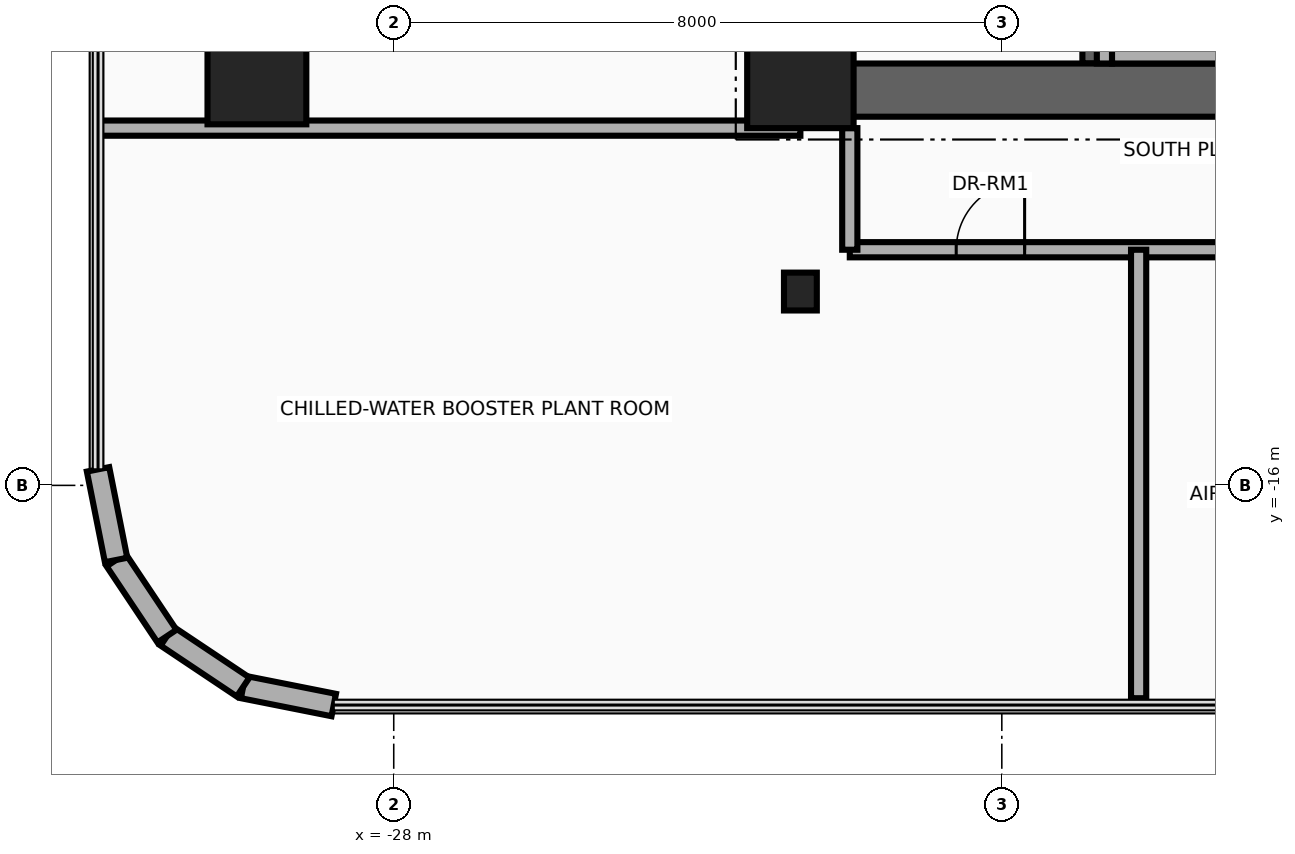
"""IFC4 building model, lengths in metres.
Left out: names, types, materials, properties, quantities, classifications, styles, units other than length and angle.
Written with IfcOpenShell. Run it as: python <this file> out.ifc"""

import sys

from ifc_helpers import new_model, si_unit, direction, frame, frame_2d, origin, origin_2d, place, context, subcontext, project, spatial, rectangle, circle, i_section, extrude, source, transform, mapped, element, fill, save


model = new_model("IFC4")
c1 = context("Model", 3, precision=1e-05, world=origin(), true_north=direction((0.0, 1.0)))
c2 = subcontext(c1, "Body", "Model", "MODEL_VIEW")
j1 = project(units=[si_unit("LENGTHUNIT", "METRE"), si_unit("PLANEANGLEUNIT", "RADIAN")], contexts=[c1])
p1 = place(None, origin())
s1 = spatial("IfcSite", under=j1, at=p1, CompositionType="ELEMENT")
p2 = place(p1, origin())
s2 = spatial("IfcBuilding", under=s1, at=p2, CompositionType="ELEMENT")
p3 = place(p2, frame((0.0, 0.0, 96.3)))
s3 = spatial("IfcBuildingStorey", under=s2, at=p3, CompositionType="ELEMENT", Elevation=96.3)
for number, where, z_axis, x_axis in (
    (1, (-22.16, -10.45, 0.0), (0.0, 0.0, 1.0), (0.0, 1.0, 0.0)),
    (2, (-18.83, -10.45, 0.0), (0.0, 0.0, 1.0), (0.0, 1.0, 0.0)),
):
    element("IfcWall", number, at=place(p3, frame(where, z_axis=z_axis, x_axis=x_axis)), inside=s3, PredefinedType="SHEAR", context=c2, shape_type="SweptSolid", body=[
        extrude(rectangle(XDim=8.67, YDim=0.22, at=frame_2d((4.335, 0.0))), origin(), (0.0, 0.0, 1.0), 4.56),
    ])
p4 = place(p3, frame((-22.65, -11.15, 0.0), z_axis=(0.0, 0.0, 1.0), x_axis=(0.0, 1.0, 0.0)))
e3 = element("IfcWall", 3, at=p4, inside=s3, PredefinedType="SHEAR", context=c2, shape_type="SweptSolid", body=[
    extrude(rectangle(XDim=22.3, YDim=0.7, at=frame_2d((11.15, 0.0))), origin(), (0.0, 0.0, 1.0), 4.56),
])
p5 = place(p3, frame((-22.65, -10.8, 0.0), z_axis=(0.0, 0.0, 1.0), x_axis=(1.0, 0.0, 0.0)))
e4 = element("IfcWall", 4, at=p5, inside=s3, PredefinedType="SHEAR", context=c2, shape_type="SweptSolid", body=[
    extrude(rectangle(XDim=10.25, YDim=0.7, at=frame_2d((5.125, 0.0))), origin(), (0.0, 0.0, 1.0), 4.56),
])
m1 = source(origin(), c2, "Body", "SweptSolid", [
    extrude(circle(Radius=0.65, at=origin_2d()), origin(), (0.0, 0.0, 1.0), 4.8),
])
p6 = place(p3, frame((-29.8, -10.6, 0.0), z_axis=(0.0, 0.0, 1.0), x_axis=(1.0, 0.0, 0.0)))
e5 = element("IfcColumn", 5, at=p6, inside=s3, PredefinedType="COLUMN", context=c2, shape_type="MappedRepresentation", body=[
    mapped(m1, transform((0.0, 0.0, 0.0), x_axis=(1.0, 0.0, 0.0), y_axis=(0.0, 1.0, 0.0), z_axis=(0.0, 0.0, 1.0), scale=1.0)),
])
m2 = source(origin(), c2, "Body", "SweptSolid", [
    extrude(rectangle(XDim=1.4, YDim=1.4, at=origin_2d()), origin(), (0.0, 0.0, 1.0), 4.8),
])
p7 = place(p3, frame((-22.65, -10.6, 0.0), z_axis=(0.0, 0.0, 1.0), x_axis=(1.0, 0.0, 0.0)))
e6 = element("IfcColumn", 6, at=p7, inside=s3, PredefinedType="COLUMN", context=c2, shape_type="MappedRepresentation", body=[
    mapped(m2, transform((0.0, 0.0, 0.0), x_axis=(1.0, 0.0, 0.0), y_axis=(0.0, 1.0, 0.0), z_axis=(0.0, 0.0, 1.0), scale=1.0)),
])
m3 = source(origin(), c2, "Body", "SweptSolid", [
    extrude(i_section(OverallWidth=0.432, OverallDepth=0.498, WebThickness=0.056, FlangeThickness=0.089, at=origin_2d()), origin(), (0.0, 0.0, 1.0), 4.8),
])
p8 = place(p3, frame((-22.65, -13.45, 0.0), z_axis=(0.0, 0.0, 1.0), x_axis=(1.0, 0.0, 0.0)))
e7 = element("IfcColumn", 7, at=p8, inside=s3, PredefinedType="COLUMN", context=c2, shape_type="MappedRepresentation", body=[
    mapped(m3, transform((0.0, 0.0, 0.0), x_axis=(1.0, 0.0, 0.0), y_axis=(0.0, 1.0, 0.0), z_axis=(0.0, 0.0, 1.0), scale=1.0)),
])
p9 = place(p3, frame((-28.789, -18.89, 0.0), z_axis=(0.0, 0.0, 1.0), x_axis=(-0.980804027463, 0.194996050505, 0.0)))
e8 = element("IfcWall", 8, at=p9, inside=s3, PredefinedType="SOLIDWALL", context=c2, shape_type="SweptSolid", body=[
    extrude(rectangle(XDim=1.216, YDim=0.3, at=frame_2d((0.608, 0.0))), origin(), (0.0, 0.0, 1.0), 4.56),
])
for number, where, z_axis, x_axis in (
    (9, (-29.982, -18.653, 0.0), (0.0, 0.0, 1.0), (-0.831, 0.556, 0.0)),
    (10, (-30.983, -17.983, 0.0), (0.0, 0.0, 1.0), (-0.556, 0.831, 0.0)),
):
    element("IfcWall", number, at=place(p3, frame(where, z_axis=z_axis, x_axis=x_axis)), inside=s3, PredefinedType="SOLIDWALL", context=c2, shape_type="SweptSolid", body=[
        extrude(rectangle(XDim=1.205, YDim=0.3, at=frame_2d((0.603, 0.0))), origin(), (0.0, 0.0, 1.0), 4.56),
    ])
p10 = place(p3, frame((-31.653, -16.982, 0.0), z_axis=(0.0, 0.0, 1.0), x_axis=(-0.194996050505, 0.980804027463, 0.0)))
e11 = element("IfcWall", 11, at=p10, inside=s3, PredefinedType="SOLIDWALL", context=c2, shape_type="SweptSolid", body=[
    extrude(rectangle(XDim=1.216, YDim=0.3, at=frame_2d((0.608, 0.0))), origin(), (0.0, 0.0, 1.0), 4.56),
])
p11 = place(p3, frame((-18.65, -10.45, 0.0), z_axis=(0.0, 0.0, 1.0), x_axis=(0.0, 1.0, 0.0)))
e12 = element("IfcWall", 12, at=p11, inside=s3, PredefinedType="MOVABLE", context=c2, shape_type="SweptSolid", body=[
    extrude(rectangle(XDim=2.35, YDim=0.2, at=frame_2d((1.175, 0.0))), origin(), (0.0, 0.0, 1.0), 3.766),
])
p12 = place(p3, frame((-18.55, -10.35, 0.0), z_axis=(0.0, 0.0, 1.0), x_axis=(1.0, 0.0, 0.0)))
e13 = element("IfcWall", 13, at=p12, inside=s3, PredefinedType="MOVABLE", context=c2, shape_type="SweptSolid", body=[
    extrude(rectangle(XDim=1.95, YDim=0.2, at=frame_2d((0.975, 0.0))), origin(), (0.0, 0.0, 1.0), 3.766),
])
p13 = place(p3, frame((-31.89, -11.3, 0.0), z_axis=(0.0, 0.0, 1.0), x_axis=(1.0, 0.0, 0.0)))
e14 = element("IfcWall", 14, at=p13, inside=s3, PredefinedType="PARTITIONING", context=c2, shape_type="SweptSolid", body=[
    extrude(rectangle(XDim=9.24, YDim=0.2, at=frame_2d((4.62, 0.0))), origin(), (0.0, 0.0, 1.0), 3.934),
])
p14 = place(p3, frame((-22.0, -12.9, 0.0), z_axis=(0.0, 0.0, 1.0), x_axis=(1.0, 0.0, 0.0)))
e15 = element("IfcWall", 15, at=p14, inside=s3, PredefinedType="PARTITIONING", context=c2, shape_type="SweptSolid", body=[
    extrude(rectangle(XDim=12.05, YDim=0.2, at=frame_2d((6.025, 0.0))), origin(), (0.0, 0.0, 1.0), 3.934),
])
p15 = place(p14, frame((1.4, 0.0, 0.0)))
e16 = element("IfcOpeningElement", 16, at=p15, cuts=e15, PredefinedType="OPENING", context=c2, shape_type="SweptSolid", body=[
    extrude(rectangle(XDim=0.9, YDim=2.1, at=frame_2d((0.45, 1.05))), frame((0.0, 0.115, 0.0), z_axis=(0.0, -1.0, 0.0), x_axis=(1.0, 0.0, 0.0)), (0.0, 0.0, 1.0), 0.23),
])
p16 = place(p14, frame((5.4, 0.0, 0.0)))
e17 = element("IfcOpeningElement", 17, at=p16, cuts=e15, PredefinedType="OPENING", context=c2, shape_type="SweptSolid", body=[
    extrude(rectangle(XDim=0.9, YDim=2.1, at=frame_2d((0.45, 1.05))), frame((0.0, 0.115, 0.0), z_axis=(0.0, -1.0, 0.0), x_axis=(1.0, 0.0, 0.0)), (0.0, 0.0, 1.0), 0.23),
])
p17 = place(p14, frame((9.9, 0.0, 0.0)))
e18 = element("IfcOpeningElement", 18, at=p17, cuts=e15, PredefinedType="OPENING", context=c2, shape_type="SweptSolid", body=[
    extrude(rectangle(XDim=0.9, YDim=2.1, at=frame_2d((0.45, 1.05))), frame((0.0, 0.115, 0.0), z_axis=(0.0, -1.0, 0.0), x_axis=(1.0, 0.0, 0.0)), (0.0, 0.0, 1.0), 0.23),
])
p18 = place(p3, frame((-18.2, -18.8, 0.0), z_axis=(0.0, 0.0, 1.0), x_axis=(0.0, 1.0, 0.0)))
e19 = element("IfcWall", 19, at=p18, inside=s3, PredefinedType="PARTITIONING", context=c2, shape_type="SweptSolid", body=[
    extrude(rectangle(XDim=5.9, YDim=0.2, at=frame_2d((2.95, 0.0))), origin(), (0.0, 0.0, 1.0), 3.996),
])
p19 = place(p3, frame((-22.0, -12.9, 0.0), z_axis=(0.0, 0.0, 1.0), x_axis=(0.0, 1.0, 0.0)))
e20 = element("IfcWall", 20, at=p19, inside=s3, PredefinedType="PARTITIONING", context=c2, shape_type="SweptSolid", body=[
    extrude(rectangle(XDim=1.6, YDim=0.2, at=frame_2d((0.8, 0.0))), origin(), (0.0, 0.0, 1.0), 4.088),
])
p20 = place(p15, origin())
e21 = element("IfcDoor", 21, at=p20, inside=s3, OperationType="SINGLE_SWING_RIGHT", PredefinedType="DOOR", context=c2, shape_type="SweptSolid", body=[
    extrude(rectangle(XDim=0.9, YDim=2.1, at=frame_2d((0.45, 1.05))), frame((0.0, 0.025, 0.0), z_axis=(0.0, -1.0, 0.0), x_axis=(1.0, 0.0, 0.0)), (0.0, 0.0, 1.0), 0.05),
])
fill(e16, e21)
save(model, sys.argv[1])
